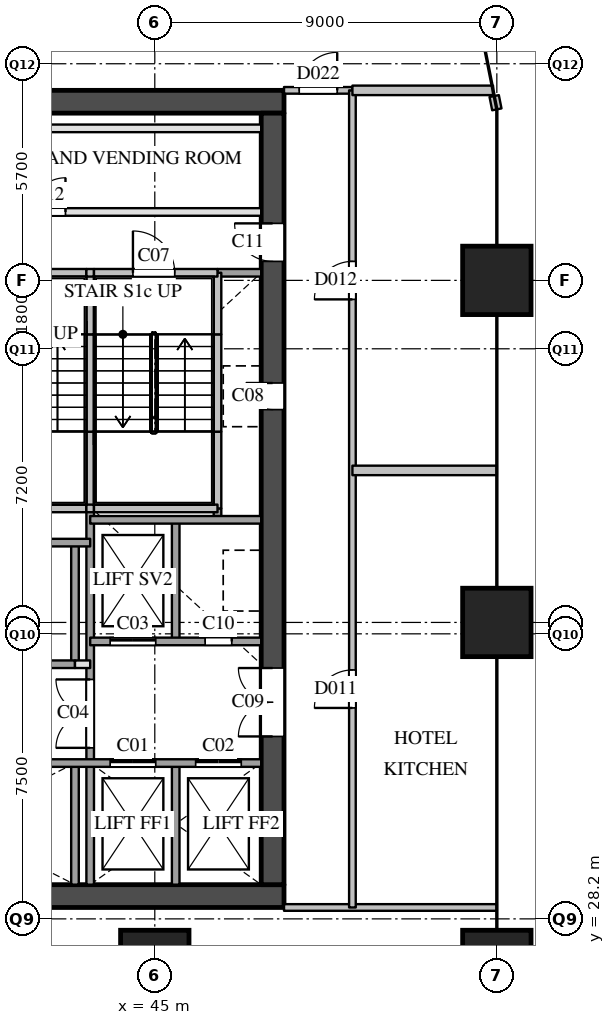
"""IFC4 building model, lengths in metres.
Left out: names, types, materials, properties, quantities, classifications, styles, units other than length and angle.
Written with IfcOpenShell. Run it as: python <this file> out.ifc"""

import sys

from ifc_helpers import new_model, si_unit, direction, frame, frame_2d, origin, origin_2d, place, context, subcontext, project, spatial, rectangle, extrude, element, fill, save


model = new_model("IFC4")
c1 = context("Model", 3, precision=1e-05, world=origin(), true_north=direction((0.0, 1.0)))
c2 = subcontext(c1, "Body", "Model", "MODEL_VIEW")
j1 = project(units=[si_unit("LENGTHUNIT", "METRE"), si_unit("PLANEANGLEUNIT", "RADIAN")], contexts=[c1])
p1 = place(None, origin())
s1 = spatial("IfcSite", under=j1, at=p1, CompositionType="ELEMENT")
p2 = place(p1, origin())
s2 = spatial("IfcBuilding", under=s1, at=p2, CompositionType="ELEMENT")
p3 = place(p2, frame((0.0, 0.0, 8.0)))
s3 = spatial("IfcBuildingStorey", under=s2, at=p3, CompositionType="ELEMENT", Elevation=8.0)
for number, where, z_axis, x_axis in (
    (1, (45.0, 27.0, 0.0), (0.0, 0.0, 1.0), (1.0, 0.0, 0.0)),
    (2, (54.0, 27.0, 0.0), (0.0, 0.0, 1.0), (1.0, 0.0, 0.0)),
    (3, (54.0, 36.0, 0.0), (0.0, 0.0, 1.0), (1.0, 0.0, 0.0)),
    (4, (54.0, 45.0, 0.0), (0.0, 0.0, 1.0), (1.0, 0.0, 0.0)),
):
    element("IfcColumn", number, at=place(p3, frame(where, z_axis=z_axis, x_axis=x_axis)), inside=s3, PredefinedType="COLUMN", context=c2, shape_type="SweptSolid", body=[
        extrude(rectangle(XDim=1.8, YDim=1.8, at=origin_2d()), origin(), (0.0, 0.0, 1.0), 6.0),
    ])
for number, where, z_axis, x_axis in (
    (5, (36.0, 28.8, 0.0), (0.0, 0.0, 1.0), (1.0, 0.0, 0.0)),
    (6, (36.0, 49.7, 0.0), (0.0, 0.0, 1.0), (1.0, 0.0, 0.0)),
):
    element("IfcWall", number, at=place(p3, frame(where, z_axis=z_axis, x_axis=x_axis)), inside=s3, PredefinedType="SHEAR", context=c2, shape_type="SweptSolid", body=[
        extrude(rectangle(XDim=12.4, YDim=0.6, at=frame_2d((6.2, 0.0))), origin(), (0.0, 0.0, 1.0), 5.59),
    ])
p4 = place(p3, frame((48.1, 29.1, 0.0), z_axis=(0.0, 0.0, 1.0), x_axis=(0.0, 1.0, 0.0)))
e7 = element("IfcWall", 7, at=p4, inside=s3, PredefinedType="SHEAR", context=c2, shape_type="SweptSolid", body=[
    extrude(rectangle(XDim=20.3, YDim=0.6, at=frame_2d((10.15, 0.0))), origin(), (0.0, 0.0, 1.0), 5.59),
])
p5 = place(p4, frame((12.5, 0.0, 0.0)))
e8 = element("IfcOpeningElement", 8, at=p5, cuts=e7, PredefinedType="OPENING", context=c2, shape_type="SweptSolid", body=[
    extrude(rectangle(XDim=0.7, YDim=2.1, at=frame_2d((0.35, 1.05))), frame((0.0, 0.31, 0.0), z_axis=(0.0, -1.0, 0.0), x_axis=(1.0, 0.0, 0.0)), (0.0, 0.0, 1.0), 0.62),
])
p6 = place(p4, frame((3.9, 0.0, 0.0)))
e9 = element("IfcOpeningElement", 9, at=p6, cuts=e7, PredefinedType="OPENING", context=c2, shape_type="SweptSolid", body=[
    extrude(rectangle(XDim=1.8, YDim=2.1, at=frame_2d((0.9, 1.05))), frame((0.0, 0.31, 0.0), z_axis=(0.0, -1.0, 0.0), x_axis=(1.0, 0.0, 0.0)), (0.0, 0.0, 1.0), 0.62),
])
p7 = place(p4, frame((16.4, 0.0, 0.0)))
e10 = element("IfcOpeningElement", 10, at=p7, cuts=e7, PredefinedType="OPENING", context=c2, shape_type="SweptSolid", body=[
    extrude(rectangle(XDim=1.0, YDim=2.1, at=frame_2d((0.5, 1.05))), frame((0.0, 0.31, 0.0), z_axis=(0.0, -1.0, 0.0), x_axis=(1.0, 0.0, 0.0)), (0.0, 0.0, 1.0), 0.62),
])
p8 = place(p3, frame((42.9, 29.1, 0.0), z_axis=(0.0, 0.0, 1.0), x_axis=(0.0, 1.0, 0.0)))
e11 = element("IfcWall", 11, at=p8, inside=s3, PredefinedType="SOLIDWALL", context=c2, shape_type="SweptSolid", body=[
    extrude(rectangle(XDim=3.2, YDim=0.2, at=frame_2d((1.6, 0.0))), origin(), (0.0, 0.0, 1.0), 5.59),
])
p9 = place(p3, frame((42.9, 34.9, 0.0), z_axis=(0.0, 0.0, 1.0), x_axis=(0.0, 1.0, 0.0)))
e12 = element("IfcWall", 12, at=p9, inside=s3, PredefinedType="SOLIDWALL", context=c2, shape_type="SweptSolid", body=[
    extrude(rectangle(XDim=3.2, YDim=0.2, at=frame_2d((1.6, 0.0))), origin(), (0.0, 0.0, 1.0), 5.59),
])
p10 = place(p3, frame((43.3, 29.1, 0.0), z_axis=(0.0, 0.0, 1.0), x_axis=(0.0, 1.0, 0.0)))
e13 = element("IfcWall", 13, at=p10, inside=s3, PredefinedType="SOLIDWALL", context=c2, shape_type="SweptSolid", body=[
    extrude(rectangle(XDim=9.9, YDim=0.2, at=frame_2d((4.95, 0.0))), origin(), (0.0, 0.0, 1.0), 5.59),
])
p11 = place(p10, frame((3.6, 0.0, 0.0)))
e14 = element("IfcOpeningElement", 14, at=p11, cuts=e13, PredefinedType="OPENING", context=c2, shape_type="SweptSolid", body=[
    extrude(rectangle(XDim=1.8, YDim=2.1, at=frame_2d((0.9, 1.05))), frame((0.0, 0.11, 0.0), z_axis=(0.0, -1.0, 0.0), x_axis=(1.0, 0.0, 0.0)), (0.0, 0.0, 1.0), 0.22),
])
p12 = place(p3, frame((43.3, 39.0, 0.0), z_axis=(0.0, 0.0, 1.0), x_axis=(0.0, 1.0, 0.0)))
e15 = element("IfcWall", 15, at=p12, inside=s3, PredefinedType="SOLIDWALL", context=c2, shape_type="SweptSolid", body=[
    extrude(rectangle(XDim=2.02, YDim=0.2, at=frame_2d((1.01, 0.0))), origin(), (0.0, 0.0, 1.0), 5.59),
])
p13 = place(p3, frame((43.3, 41.02, 0.0), z_axis=(0.0, 0.0, 1.0), x_axis=(0.0, 1.0, 0.0)))
e16 = element("IfcWall", 16, at=p13, inside=s3, PredefinedType="SOLIDWALL", context=c2, shape_type="SweptSolid", body=[
    extrude(rectangle(XDim=2.56, YDim=0.2, at=frame_2d((1.28, 0.0))), origin(), (0.0, 0.0, 1.0), 5.59),
])
p14 = place(p3, frame((43.3, 43.58, 0.0), z_axis=(0.0, 0.0, 1.0), x_axis=(0.0, 1.0, 0.0)))
e17 = element("IfcWall", 17, at=p14, inside=s3, PredefinedType="SOLIDWALL", context=c2, shape_type="SweptSolid", body=[
    extrude(rectangle(XDim=1.62, YDim=0.2, at=frame_2d((0.81, 0.0))), origin(), (0.0, 0.0, 1.0), 5.59),
])
for number, where, z_axis, x_axis in (
    (18, (45.55, 29.1, 0.0), (0.0, 0.0, 1.0), (0.0, 1.0, 0.0)),
    (19, (45.55, 35.5, 0.0), (0.0, 0.0, 1.0), (0.0, 1.0, 0.0)),
):
    element("IfcWall", number, at=place(p3, frame(where, z_axis=z_axis, x_axis=x_axis)), inside=s3, PredefinedType="SOLIDWALL", context=c2, shape_type="SweptSolid", body=[
        extrude(rectangle(XDim=3.2, YDim=0.2, at=frame_2d((1.6, 0.0))), origin(), (0.0, 0.0, 1.0), 5.59),
    ])
p15 = place(p3, frame((46.65, 38.7, 0.0), z_axis=(0.0, 0.0, 1.0), x_axis=(0.0, 1.0, 0.0)))
e20 = element("IfcWall", 20, at=p15, inside=s3, PredefinedType="SOLIDWALL", context=c2, shape_type="SweptSolid", body=[
    extrude(rectangle(XDim=0.3, YDim=0.2, at=frame_2d((0.15, 0.0))), origin(), (0.0, 0.0, 1.0), 5.59),
])
p16 = place(p3, frame((46.65, 39.0, 0.0), z_axis=(0.0, 0.0, 1.0), x_axis=(0.0, 1.0, 0.0)))
e21 = element("IfcWall", 21, at=p16, inside=s3, PredefinedType="SOLIDWALL", context=c2, shape_type="SweptSolid", body=[
    extrude(rectangle(XDim=2.02, YDim=0.2, at=frame_2d((1.01, 0.0))), origin(), (0.0, 0.0, 1.0), 5.59),
])
p17 = place(p3, frame((46.65, 41.02, 0.0), z_axis=(0.0, 0.0, 1.0), x_axis=(0.0, 1.0, 0.0)))
e22 = element("IfcWall", 22, at=p17, inside=s3, PredefinedType="SOLIDWALL", context=c2, shape_type="SweptSolid", body=[
    extrude(rectangle(XDim=2.56, YDim=0.2, at=frame_2d((1.28, 0.0))), origin(), (0.0, 0.0, 1.0), 5.59),
])
p18 = place(p3, frame((46.65, 43.58, 0.0), z_axis=(0.0, 0.0, 1.0), x_axis=(0.0, 1.0, 0.0)))
e23 = element("IfcWall", 23, at=p18, inside=s3, PredefinedType="SOLIDWALL", context=c2, shape_type="SweptSolid", body=[
    extrude(rectangle(XDim=1.62, YDim=0.2, at=frame_2d((0.81, 0.0))), origin(), (0.0, 0.0, 1.0), 5.59),
])
p19 = place(p3, frame((36.6, 32.3, 0.0), z_axis=(0.0, 0.0, 1.0), x_axis=(1.0, 0.0, 0.0)))
e24 = element("IfcWall", 24, at=p19, inside=s3, PredefinedType="SOLIDWALL", context=c2, shape_type="SweptSolid", body=[
    extrude(rectangle(XDim=11.2, YDim=0.2, at=frame_2d((5.6, 0.0))), origin(), (0.0, 0.0, 1.0), 5.59),
])
p20 = place(p19, frame((7.225, 0.0, 0.0)))
e25 = element("IfcOpeningElement", 25, at=p20, cuts=e24, PredefinedType="OPENING", context=c2, shape_type="SweptSolid", body=[
    extrude(rectangle(XDim=1.2, YDim=2.1, at=frame_2d((0.6, 1.05))), frame((0.0, 0.11, 0.0), z_axis=(0.0, -1.0, 0.0), x_axis=(1.0, 0.0, 0.0)), (0.0, 0.0, 1.0), 0.22),
])
p21 = place(p19, frame((9.475, 0.0, 0.0)))
e26 = element("IfcOpeningElement", 26, at=p21, cuts=e24, PredefinedType="OPENING", context=c2, shape_type="SweptSolid", body=[
    extrude(rectangle(XDim=1.2, YDim=2.1, at=frame_2d((0.6, 1.05))), frame((0.0, 0.11, 0.0), z_axis=(0.0, -1.0, 0.0), x_axis=(1.0, 0.0, 0.0)), (0.0, 0.0, 1.0), 0.22),
])
p22 = place(p3, frame((42.9, 34.9, 0.0), z_axis=(0.0, 0.0, 1.0), x_axis=(1.0, 0.0, 0.0)))
e27 = element("IfcWall", 27, at=p22, inside=s3, PredefinedType="PARTITIONING", context=c2, shape_type="SweptSolid", body=[
    extrude(rectangle(XDim=0.4, YDim=0.2, at=frame_2d((0.2, 0.0))), origin(), (0.0, 0.0, 1.0), 5.59),
])
p23 = place(p3, frame((36.6, 34.9, 0.0), z_axis=(0.0, 0.0, 1.0), x_axis=(1.0, 0.0, 0.0)))
e28 = element("IfcWall", 28, at=p23, inside=s3, PredefinedType="SOLIDWALL", context=c2, shape_type="SweptSolid", body=[
    extrude(rectangle(XDim=6.3, YDim=0.2, at=frame_2d((3.15, 0.0))), origin(), (0.0, 0.0, 1.0), 5.59),
])
p24 = place(p3, frame((43.3, 35.5, 0.0), z_axis=(0.0, 0.0, 1.0), x_axis=(1.0, 0.0, 0.0)))
e29 = element("IfcWall", 29, at=p24, inside=s3, PredefinedType="SOLIDWALL", context=c2, shape_type="SweptSolid", body=[
    extrude(rectangle(XDim=4.5, YDim=0.2, at=frame_2d((2.25, 0.0))), origin(), (0.0, 0.0, 1.0), 5.59),
])
p25 = place(p24, frame((0.525, 0.0, 0.0)))
e30 = element("IfcOpeningElement", 30, at=p25, cuts=e29, PredefinedType="OPENING", context=c2, shape_type="SweptSolid", body=[
    extrude(rectangle(XDim=1.2, YDim=2.1, at=frame_2d((0.6, 1.05))), frame((0.0, 0.11, 0.0), z_axis=(0.0, -1.0, 0.0), x_axis=(1.0, 0.0, 0.0)), (0.0, 0.0, 1.0), 0.22),
])
p26 = place(p24, frame((3.025, 0.0, 0.0)))
e31 = element("IfcOpeningElement", 31, at=p26, cuts=e29, PredefinedType="OPENING", context=c2, shape_type="SweptSolid", body=[
    extrude(rectangle(XDim=0.7, YDim=2.1, at=frame_2d((0.35, 1.05))), frame((0.0, 0.11, 0.0), z_axis=(0.0, -1.0, 0.0), x_axis=(1.0, 0.0, 0.0)), (0.0, 0.0, 1.0), 0.22),
])
p27 = place(p3, frame((36.6, 38.1, 0.0), z_axis=(0.0, 0.0, 1.0), x_axis=(1.0, 0.0, 0.0)))
e32 = element("IfcWall", 32, at=p27, inside=s3, PredefinedType="SOLIDWALL", context=c2, shape_type="SweptSolid", body=[
    extrude(rectangle(XDim=6.7, YDim=0.2, at=frame_2d((3.35, 0.0))), origin(), (0.0, 0.0, 1.0), 5.59),
])
p28 = place(p3, frame((43.3, 38.7, 0.0), z_axis=(0.0, 0.0, 1.0), x_axis=(1.0, 0.0, 0.0)))
e33 = element("IfcWall", 33, at=p28, inside=s3, PredefinedType="SOLIDWALL", context=c2, shape_type="SweptSolid", body=[
    extrude(rectangle(XDim=4.5, YDim=0.2, at=frame_2d((2.25, 0.0))), origin(), (0.0, 0.0, 1.0), 5.59),
])
p29 = place(p3, frame((40.05, 39.0, 0.0), z_axis=(0.0, 0.0, 1.0), x_axis=(1.0, 0.0, 0.0)))
e34 = element("IfcWall", 34, at=p29, inside=s3, PredefinedType="SOLIDWALL", context=c2, shape_type="SweptSolid", body=[
    extrude(rectangle(XDim=3.15, YDim=0.2, at=frame_2d((1.575, 0.0))), origin(), (0.0, 0.0, 1.0), 5.59),
])
p30 = place(p3, frame((43.2, 39.0, 0.0), z_axis=(0.0, 0.0, 1.0), x_axis=(1.0, 0.0, 0.0)))
e35 = element("IfcWall", 35, at=p30, inside=s3, PredefinedType="SOLIDWALL", context=c2, shape_type="SweptSolid", body=[
    extrude(rectangle(XDim=0.2, YDim=0.2, at=frame_2d((0.1, 0.0))), origin(), (0.0, 0.0, 1.0), 5.59),
])
p31 = place(p3, frame((43.4, 39.0, 0.0), z_axis=(0.0, 0.0, 1.0), x_axis=(1.0, 0.0, 0.0)))
e36 = element("IfcWall", 36, at=p31, inside=s3, PredefinedType="SOLIDWALL", context=c2, shape_type="SweptSolid", body=[
    extrude(rectangle(XDim=3.25, YDim=0.2, at=frame_2d((1.625, 0.0))), origin(), (0.0, 0.0, 1.0), 5.59),
])
p32 = place(p3, frame((46.65, 45.2, 0.0), z_axis=(0.0, 0.0, 1.0), x_axis=(1.0, 0.0, 0.0)))
e37 = element("IfcWall", 37, at=p32, inside=s3, PredefinedType="SOLIDWALL", context=c2, shape_type="SweptSolid", body=[
    extrude(rectangle(XDim=1.15, YDim=0.2, at=frame_2d((0.575, 0.0))), origin(), (0.0, 0.0, 1.0), 5.59),
])
p33 = place(p3, frame((40.05, 45.2, 0.0), z_axis=(0.0, 0.0, 1.0), x_axis=(1.0, 0.0, 0.0)))
e38 = element("IfcWall", 38, at=p33, inside=s3, PredefinedType="SOLIDWALL", context=c2, shape_type="SweptSolid", body=[
    extrude(rectangle(XDim=3.15, YDim=0.2, at=frame_2d((1.575, 0.0))), origin(), (0.0, 0.0, 1.0), 5.59),
])
p34 = place(p33, frame((1.025, 0.0, 0.0)))
e39 = element("IfcOpeningElement", 39, at=p34, cuts=e38, PredefinedType="OPENING", context=c2, shape_type="SweptSolid", body=[
    extrude(rectangle(XDim=1.1, YDim=2.1, at=frame_2d((0.55, 1.05))), frame((0.0, 0.11, 0.0), z_axis=(0.0, -1.0, 0.0), x_axis=(1.0, 0.0, 0.0)), (0.0, 0.0, 1.0), 0.22),
])
p35 = place(p3, frame((43.2, 45.2, 0.0), z_axis=(0.0, 0.0, 1.0), x_axis=(1.0, 0.0, 0.0)))
e40 = element("IfcWall", 40, at=p35, inside=s3, PredefinedType="SOLIDWALL", context=c2, shape_type="SweptSolid", body=[
    extrude(rectangle(XDim=0.2, YDim=0.2, at=frame_2d((0.1, 0.0))), origin(), (0.0, 0.0, 1.0), 5.59),
])
p36 = place(p3, frame((43.4, 45.2, 0.0), z_axis=(0.0, 0.0, 1.0), x_axis=(1.0, 0.0, 0.0)))
e41 = element("IfcWall", 41, at=p36, inside=s3, PredefinedType="SOLIDWALL", context=c2, shape_type="SweptSolid", body=[
    extrude(rectangle(XDim=3.25, YDim=0.2, at=frame_2d((1.625, 0.0))), origin(), (0.0, 0.0, 1.0), 5.59),
])
p37 = place(p36, frame((1.025, 0.0, 0.0)))
e42 = element("IfcOpeningElement", 42, at=p37, cuts=e41, PredefinedType="OPENING", context=c2, shape_type="SweptSolid", body=[
    extrude(rectangle(XDim=1.1, YDim=2.1, at=frame_2d((0.55, 1.05))), frame((0.0, 0.11, 0.0), z_axis=(0.0, -1.0, 0.0), x_axis=(1.0, 0.0, 0.0)), (0.0, 0.0, 1.0), 0.22),
])
p38 = place(p3, frame((36.6, 46.8, 0.0), z_axis=(0.0, 0.0, 1.0), x_axis=(1.0, 0.0, 0.0)))
e43 = element("IfcWall", 43, at=p38, inside=s3, PredefinedType="PARTITIONING", context=c2, shape_type="SweptSolid", body=[
    extrude(rectangle(XDim=11.2, YDim=0.2, at=frame_2d((5.6, 0.0))), origin(), (0.0, 0.0, 1.0), 5.59),
])
p39 = place(p38, frame((5.15, 0.0, 0.0)))
e44 = element("IfcOpeningElement", 44, at=p39, cuts=e43, PredefinedType="OPENING", context=c2, shape_type="SweptSolid", body=[
    extrude(rectangle(XDim=0.9, YDim=2.1, at=frame_2d((0.45, 1.05))), frame((0.0, 0.11, 0.0), z_axis=(0.0, -1.0, 0.0), x_axis=(1.0, 0.0, 0.0)), (0.0, 0.0, 1.0), 0.22),
])
p40 = place(p3, frame((36.6, 49.0, 0.0), z_axis=(0.0, 0.0, 1.0), x_axis=(1.0, 0.0, 0.0)))
e45 = element("IfcWall", 45, at=p40, inside=s3, PredefinedType="PARTITIONING", context=c2, shape_type="SweptSolid", body=[
    extrude(rectangle(XDim=11.2, YDim=0.2, at=frame_2d((5.6, 0.0))), origin(), (0.0, 0.0, 1.0), 5.59),
])
p41 = place(p3, frame((48.4, 28.5, 0.0), z_axis=(0.0, 0.0, 1.0), x_axis=(1.0, 0.0, 0.0)))
e46 = element("IfcWall", 46, at=p41, inside=s3, PredefinedType="PARTITIONING", context=c2, shape_type="SweptSolid", body=[
    extrude(rectangle(XDim=5.6, YDim=0.175, at=frame_2d((2.8, 0.0))), origin(), (0.0, 0.0, 1.0), 4.59),
])
p42 = place(p3, frame((48.4, 50.0, 0.0), z_axis=(0.0, 0.0, 1.0), x_axis=(1.0, 0.0, 0.0)))
e47 = element("IfcWall", 47, at=p42, inside=s3, PredefinedType="PARTITIONING", context=c2, shape_type="SweptSolid", body=[
    extrude(rectangle(XDim=1.8, YDim=0.175, at=frame_2d((0.9, 0.0))), origin(), (0.0, 0.0, 1.0), 5.59),
])
p43 = place(p42, frame((0.4, 0.0, 0.0)))
e48 = element("IfcOpeningElement", 48, at=p43, cuts=e47, PredefinedType="OPENING", context=c2, shape_type="SweptSolid", body=[
    extrude(rectangle(XDim=1.0, YDim=2.1, at=frame_2d((0.5, 1.05))), frame((0.0, 0.097, 0.0), z_axis=(0.0, -1.0, 0.0), x_axis=(1.0, 0.0, 0.0)), (0.0, 0.0, 1.0), 0.195),
])
p44 = place(p3, frame((50.2, 28.5, 0.0), z_axis=(0.0, 0.0, 1.0), x_axis=(0.0, 1.0, 0.0)))
e49 = element("IfcWall", 49, at=p44, inside=s3, PredefinedType="PARTITIONING", context=c2, shape_type="SweptSolid", body=[
    extrude(rectangle(XDim=21.5, YDim=0.175, at=frame_2d((10.75, 0.0))), origin(), (0.0, 0.0, 1.0), 5.59),
])
p45 = place(p44, frame((5.25, 0.0, 0.0)))
e50 = element("IfcOpeningElement", 50, at=p45, cuts=e49, PredefinedType="OPENING", context=c2, shape_type="SweptSolid", body=[
    extrude(rectangle(XDim=1.0, YDim=2.1, at=frame_2d((0.5, 1.05))), frame((0.0, 0.097, 0.0), z_axis=(0.0, -1.0, 0.0), x_axis=(1.0, 0.0, 0.0)), (0.0, 0.0, 1.0), 0.195),
])
p46 = place(p44, frame((16.0, 0.0, 0.0)))
e51 = element("IfcOpeningElement", 51, at=p46, cuts=e49, PredefinedType="OPENING", context=c2, shape_type="SweptSolid", body=[
    extrude(rectangle(XDim=1.0, YDim=2.1, at=frame_2d((0.5, 1.05))), frame((0.0, 0.097, 0.0), z_axis=(0.0, -1.0, 0.0), x_axis=(1.0, 0.0, 0.0)), (0.0, 0.0, 1.0), 0.195),
])
p47 = place(p3, frame((50.2, 40.0, 0.0), z_axis=(0.0, 0.0, 1.0), x_axis=(1.0, 0.0, 0.0)))
e52 = element("IfcWall", 52, at=p47, inside=s3, PredefinedType="PARTITIONING", context=c2, shape_type="SweptSolid", body=[
    extrude(rectangle(XDim=3.8, YDim=0.25, at=frame_2d((1.9, 0.0))), origin(), (0.0, 0.0, 1.0), 4.59),
])
p48 = place(p3, frame((50.2, 50.0, 0.0), z_axis=(0.0, 0.0, 1.0), x_axis=(1.0, 0.0, 0.0)))
e53 = element("IfcWall", 53, at=p48, inside=s3, PredefinedType="PARTITIONING", context=c2, shape_type="SweptSolid", body=[
    extrude(rectangle(XDim=3.7, YDim=0.25, at=frame_2d((1.85, 0.0))), origin(), (0.0, 0.0, 1.0), 4.59),
])
p49 = place(p3, frame((53.93, 49.851, 0.0), z_axis=(0.0, 0.0, 1.0), x_axis=(0.194670995803, -0.980868596395, 0.0)))
e54 = element("IfcWall", 54, at=p49, inside=s3, PredefinedType="PARTITIONING", context=c2, shape_type="SweptSolid", body=[
    extrude(rectangle(XDim=0.357, YDim=0.25, at=frame_2d((0.179, 0.0))), origin(), (0.0, 0.0, 1.0), 4.59),
])
p50 = place(p20, origin())
e55 = element("IfcDoor", 55, at=p50, inside=s3, OperationType="SLIDING_TO_LEFT", PredefinedType="DOOR", context=c2, shape_type="SweptSolid", body=[
    extrude(rectangle(XDim=1.2, YDim=2.1, at=frame_2d((0.6, 1.05))), frame((0.0, 0.025, 0.0), z_axis=(0.0, -1.0, 0.0), x_axis=(1.0, 0.0, 0.0)), (0.0, 0.0, 1.0), 0.05),
])
fill(e25, e55)
p51 = place(p21, origin())
e56 = element("IfcDoor", 56, at=p51, inside=s3, OperationType="SLIDING_TO_LEFT", PredefinedType="DOOR", context=c2, shape_type="SweptSolid", body=[
    extrude(rectangle(XDim=1.2, YDim=2.1, at=frame_2d((0.6, 1.05))), frame((0.0, 0.025, 0.0), z_axis=(0.0, -1.0, 0.0), x_axis=(1.0, 0.0, 0.0)), (0.0, 0.0, 1.0), 0.05),
])
fill(e26, e56)
p52 = place(p25, origin())
e57 = element("IfcDoor", 57, at=p52, inside=s3, OperationType="SLIDING_TO_LEFT", PredefinedType="DOOR", context=c2, shape_type="SweptSolid", body=[
    extrude(rectangle(XDim=1.2, YDim=2.1, at=frame_2d((0.6, 1.05))), frame((0.0, 0.025, 0.0), z_axis=(0.0, -1.0, 0.0), x_axis=(1.0, 0.0, 0.0)), (0.0, 0.0, 1.0), 0.05),
])
fill(e30, e57)
p53 = place(p11, origin())
e58 = element("IfcDoor", 58, at=p53, inside=s3, OperationType="DOUBLE_DOOR_SINGLE_SWING", PredefinedType="DOOR", context=c2, shape_type="SweptSolid", body=[
    extrude(rectangle(XDim=1.8, YDim=2.1, at=frame_2d((0.9, 1.05))), frame((0.0, 0.025, 0.0), z_axis=(0.0, -1.0, 0.0), x_axis=(1.0, 0.0, 0.0)), (0.0, 0.0, 1.0), 0.05),
])
fill(e14, e58)
p54 = place(p37, origin())
e59 = element("IfcDoor", 59, at=p54, inside=s3, OperationType="SINGLE_SWING_LEFT", PredefinedType="DOOR", context=c2, shape_type="SweptSolid", body=[
    extrude(rectangle(XDim=1.1, YDim=2.1, at=frame_2d((0.55, 1.05))), frame((0.0, 0.025, 0.0), z_axis=(0.0, -1.0, 0.0), x_axis=(1.0, 0.0, 0.0)), (0.0, 0.0, 1.0), 0.05),
])
fill(e42, e59)
p55 = place(p5, origin())
e60 = element("IfcDoor", 60, at=p55, inside=s3, OperationType="SINGLE_SWING_RIGHT", PredefinedType="DOOR", context=c2, shape_type="SweptSolid", body=[
    extrude(rectangle(XDim=0.7, YDim=2.1, at=frame_2d((0.35, 1.05))), frame((0.0, 0.025, 0.0), z_axis=(0.0, -1.0, 0.0), x_axis=(1.0, 0.0, 0.0)), (0.0, 0.0, 1.0), 0.05),
])
fill(e8, e60)
p56 = place(p6, origin())
e61 = element("IfcDoor", 61, at=p56, inside=s3, OperationType="DOUBLE_DOOR_SINGLE_SWING", PredefinedType="DOOR", context=c2, shape_type="SweptSolid", body=[
    extrude(rectangle(XDim=1.8, YDim=2.1, at=frame_2d((0.9, 1.05))), frame((0.0, 0.025, 0.0), z_axis=(0.0, -1.0, 0.0), x_axis=(1.0, 0.0, 0.0)), (0.0, 0.0, 1.0), 0.05),
])
fill(e9, e61)
p57 = place(p26, origin())
e62 = element("IfcDoor", 62, at=p57, inside=s3, OperationType="SINGLE_SWING_RIGHT", PredefinedType="DOOR", context=c2, shape_type="SweptSolid", body=[
    extrude(rectangle(XDim=0.7, YDim=2.1, at=frame_2d((0.35, 1.05))), frame((0.0, 0.025, 0.0), z_axis=(0.0, -1.0, 0.0), x_axis=(1.0, 0.0, 0.0)), (0.0, 0.0, 1.0), 0.05),
])
fill(e31, e62)
p58 = place(p7, origin())
e63 = element("IfcDoor", 63, at=p58, inside=s3, OperationType="SINGLE_SWING_RIGHT", PredefinedType="DOOR", context=c2, shape_type="SweptSolid", body=[
    extrude(rectangle(XDim=1.0, YDim=2.1, at=frame_2d((0.5, 1.05))), frame((0.0, 0.025, 0.0), z_axis=(0.0, -1.0, 0.0), x_axis=(1.0, 0.0, 0.0)), (0.0, 0.0, 1.0), 0.05),
])
fill(e10, e63)
p59 = place(p39, origin())
e64 = element("IfcDoor", 64, at=p59, inside=s3, OperationType="SINGLE_SWING_RIGHT", PredefinedType="DOOR", context=c2, shape_type="SweptSolid", body=[
    extrude(rectangle(XDim=0.9, YDim=2.1, at=frame_2d((0.45, 1.05))), frame((0.0, 0.025, 0.0), z_axis=(0.0, -1.0, 0.0), x_axis=(1.0, 0.0, 0.0)), (0.0, 0.0, 1.0), 0.05),
])
fill(e44, e64)
p60 = place(p45, origin())
e65 = element("IfcDoor", 65, at=p60, inside=s3, OperationType="SINGLE_SWING_LEFT", PredefinedType="DOOR", context=c2, shape_type="SweptSolid", body=[
    extrude(rectangle(XDim=1.0, YDim=2.1, at=frame_2d((0.5, 1.05))), frame((0.0, 0.025, 0.0), z_axis=(0.0, -1.0, 0.0), x_axis=(1.0, 0.0, 0.0)), (0.0, 0.0, 1.0), 0.05),
])
fill(e50, e65)
p61 = place(p46, origin())
e66 = element("IfcDoor", 66, at=p61, inside=s3, OperationType="SINGLE_SWING_LEFT", PredefinedType="DOOR", context=c2, shape_type="SweptSolid", body=[
    extrude(rectangle(XDim=1.0, YDim=2.1, at=frame_2d((0.5, 1.05))), frame((0.0, 0.025, 0.0), z_axis=(0.0, -1.0, 0.0), x_axis=(1.0, 0.0, 0.0)), (0.0, 0.0, 1.0), 0.05),
])
fill(e51, e66)
p62 = place(p43, origin())
e67 = element("IfcDoor", 67, at=p62, inside=s3, OperationType="SINGLE_SWING_RIGHT", PredefinedType="DOOR", context=c2, shape_type="SweptSolid", body=[
    extrude(rectangle(XDim=1.0, YDim=2.1, at=frame_2d((0.5, 1.05))), frame((0.0, 0.025, 0.0), z_axis=(0.0, -1.0, 0.0), x_axis=(1.0, 0.0, 0.0)), (0.0, 0.0, 1.0), 0.05),
])
fill(e48, e67)
save(model, sys.argv[1])
